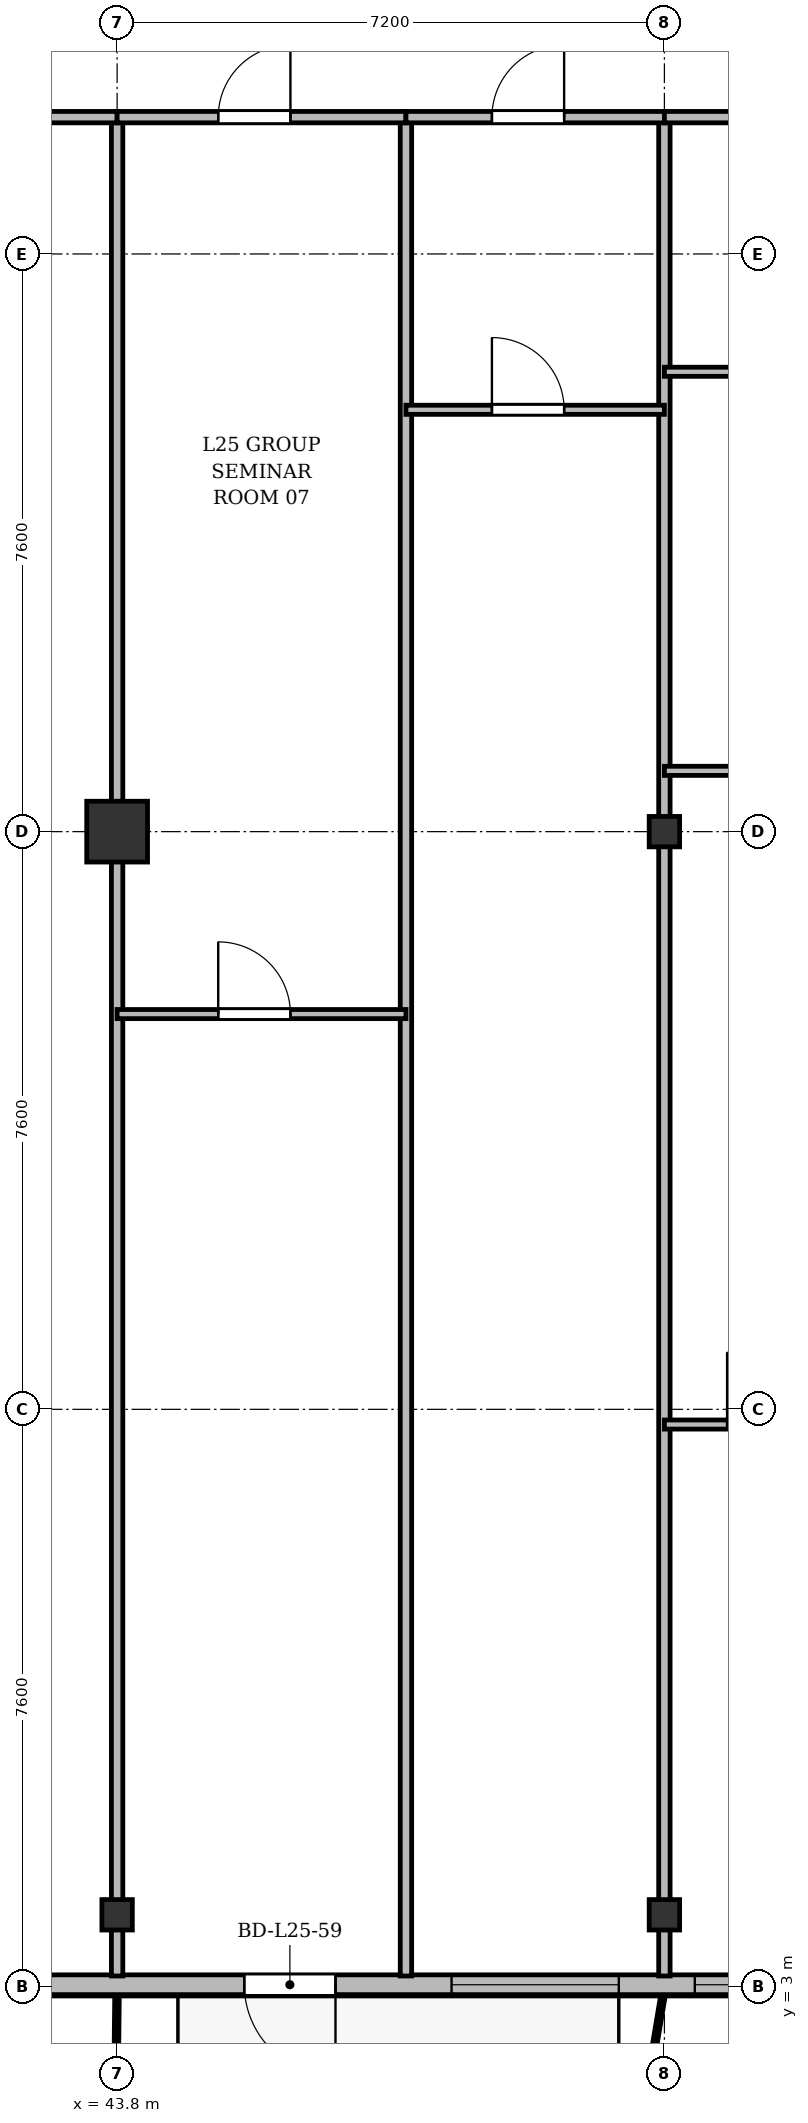
"""IFC4 building model, lengths in metres.
Left out: names, types, materials, properties, quantities, classifications, styles, units other than length and angle.
Written with IfcOpenShell. Run it as: python <this file> out.ifc"""

import sys

from ifc_helpers import new_model, si_unit, direction, frame, frame_2d, origin, origin_2d, place, context, subcontext, project, spatial, rectangle, i_section, extrude, source, transform, mapped, element, fill, save


model = new_model("IFC4")
c1 = context("Model", 3, precision=1e-05, world=origin(), true_north=direction((0.0, 1.0)))
c2 = subcontext(c1, "Body", "Model", "MODEL_VIEW")
j1 = project(units=[si_unit("LENGTHUNIT", "METRE"), si_unit("PLANEANGLEUNIT", "RADIAN")], contexts=[c1])
p1 = place(None, origin())
s1 = spatial("IfcSite", under=j1, at=p1, CompositionType="ELEMENT")
p2 = place(p1, origin())
s2 = spatial("IfcBuilding", under=s1, at=p2, CompositionType="ELEMENT")
p3 = place(p2, frame((0.0, 0.0, 99.7)))
s3 = spatial("IfcBuildingStorey", under=s2, at=p3, CompositionType="ELEMENT", Elevation=99.7)
m1 = source(origin(), c2, "Body", "SweptSolid", [
    extrude(i_section(OverallWidth=0.4, OverallDepth=0.4, WebThickness=0.022, FlangeThickness=0.035, at=origin_2d()), origin(), (0.0, 0.0, 1.0), 3.6),
])
p4 = place(p3, frame((43.8, 3.95, 0.0), z_axis=(0.0, 0.0, 1.0), x_axis=(1.0, 0.0, 0.0)))
e1 = element("IfcColumn", 1, at=p4, inside=s3, PredefinedType="COLUMN", context=c2, shape_type="MappedRepresentation", body=[
    mapped(m1, transform((0.0, 0.0, 0.0), x_axis=(1.0, 0.0, 0.0), y_axis=(0.0, 1.0, 0.0), z_axis=(0.0, 0.0, 1.0), scale=1.0)),
])
m2 = source(origin(), c2, "Body", "SweptSolid", [
    extrude(rectangle(XDim=0.8, YDim=0.8, at=origin_2d()), origin(), (0.0, 0.0, 1.0), 3.6),
])
p5 = place(p3, frame((43.8, 18.2, 0.0), z_axis=(0.0, 0.0, 1.0), x_axis=(1.0, 0.0, 0.0)))
e2 = element("IfcColumn", 2, at=p5, inside=s3, PredefinedType="COLUMN", context=c2, shape_type="MappedRepresentation", body=[
    mapped(m2, transform((0.0, 0.0, 0.0), x_axis=(1.0, 0.0, 0.0), y_axis=(0.0, 1.0, 0.0), z_axis=(0.0, 0.0, 1.0), scale=1.0)),
])
for number, where, z_axis, x_axis in (
    (3, (51.0, 3.95, 0.0), (0.0, 0.0, 1.0), (1.0, 0.0, 0.0)),
    (4, (51.0, 18.2, 0.0), (0.0, 0.0, 1.0), (1.0, 0.0, 0.0)),
):
    element("IfcColumn", number, at=place(p3, frame(where, z_axis=z_axis, x_axis=x_axis)), inside=s3, PredefinedType="COLUMN", context=c2, shape_type="MappedRepresentation", body=[
        mapped(m1, transform((0.0, 0.0, 0.0), x_axis=(1.0, 0.0, 0.0), y_axis=(0.0, 1.0, 0.0), z_axis=(0.0, 0.0, 1.0), scale=1.0)),
    ])
p6 = place(p3, frame((66.9, 3.03, 0.0), z_axis=(0.0, 0.0, 1.0), x_axis=(-1.0, 0.0, 0.0)))
e5 = element("IfcWall", 5, at=p6, inside=s3, PredefinedType="SOLIDWALL", context=c2, shape_type="SweptSolid", body=[
    extrude(rectangle(XDim=59.4, YDim=0.26, at=frame_2d((29.7, 0.0))), origin(), (0.0, 0.0, 1.0), 3.34),
])
p7 = place(p6, frame((1.9, 0.0, 0.9)))
e6 = element("IfcOpeningElement", 6, at=p7, cuts=e5, PredefinedType="OPENING", context=c2, shape_type="SweptSolid", body=[
    extrude(rectangle(XDim=2.2, YDim=1.8, at=frame_2d((1.1, 0.9))), frame((0.0, 0.14, 0.0), z_axis=(0.0, -1.0, 0.0), x_axis=(1.0, 0.0, 0.0)), (0.0, 0.0, 1.0), 0.28),
])
p8 = place(p6, frame((5.65, 0.0, 0.9)))
e7 = element("IfcOpeningElement", 7, at=p8, cuts=e5, PredefinedType="OPENING", context=c2, shape_type="SweptSolid", body=[
    extrude(rectangle(XDim=1.5, YDim=1.75, at=frame_2d((0.75, 0.875))), frame((0.0, 0.14, 0.0), z_axis=(0.0, -1.0, 0.0), x_axis=(1.0, 0.0, 0.0)), (0.0, 0.0, 1.0), 0.28),
])
p9 = place(p6, frame((8.4, 0.0, 0.9)))
e8 = element("IfcOpeningElement", 8, at=p9, cuts=e5, PredefinedType="OPENING", context=c2, shape_type="SweptSolid", body=[
    extrude(rectangle(XDim=2.0, YDim=1.95, at=frame_2d((1.0, 0.975))), frame((0.0, 0.14, 0.0), z_axis=(0.0, -1.0, 0.0), x_axis=(1.0, 0.0, 0.0)), (0.0, 0.0, 1.0), 0.28),
])
p10 = place(p6, frame((11.175, 0.0, 0.9)))
e9 = element("IfcOpeningElement", 9, at=p10, cuts=e5, PredefinedType="OPENING", context=c2, shape_type="SweptSolid", body=[
    extrude(rectangle(XDim=1.65, YDim=1.85, at=frame_2d((0.825, 0.925))), frame((0.0, 0.14, 0.0), z_axis=(0.0, -1.0, 0.0), x_axis=(1.0, 0.0, 0.0)), (0.0, 0.0, 1.0), 0.28),
])
p11 = place(p6, frame((13.7, 0.0, 0.9)))
e10 = element("IfcOpeningElement", 10, at=p11, cuts=e5, PredefinedType="OPENING", context=c2, shape_type="SweptSolid", body=[
    extrude(rectangle(XDim=1.8, YDim=1.8, at=frame_2d((0.9, 0.9))), frame((0.0, 0.14, 0.0), z_axis=(0.0, -1.0, 0.0), x_axis=(1.0, 0.0, 0.0)), (0.0, 0.0, 1.0), 0.28),
])
p12 = place(p6, frame((16.5, 0.0, 0.9)))
e11 = element("IfcOpeningElement", 11, at=p12, cuts=e5, PredefinedType="OPENING", context=c2, shape_type="SweptSolid", body=[
    extrude(rectangle(XDim=2.2, YDim=1.8, at=frame_2d((1.1, 0.9))), frame((0.0, 0.14, 0.0), z_axis=(0.0, -1.0, 0.0), x_axis=(1.0, 0.0, 0.0)), (0.0, 0.0, 1.0), 0.28),
])
p13 = place(p6, frame((20.227, 0.0, 0.0)))
e12 = element("IfcOpeningElement", 12, at=p13, cuts=e5, PredefinedType="OPENING", context=c2, shape_type="SweptSolid", body=[
    extrude(rectangle(XDim=1.2, YDim=2.2, at=frame_2d((0.6, 1.1))), frame((0.0, 0.14, 0.0), z_axis=(0.0, -1.0, 0.0), x_axis=(1.0, 0.0, 0.0)), (0.0, 0.0, 1.0), 0.28),
])
p14 = place(p6, frame((28.7, 0.0, 0.9)))
e13 = element("IfcOpeningElement", 13, at=p14, cuts=e5, PredefinedType="OPENING", context=c2, shape_type="SweptSolid", body=[
    extrude(rectangle(XDim=2.0, YDim=1.95, at=frame_2d((1.0, 0.975))), frame((0.0, 0.14, 0.0), z_axis=(0.0, -1.0, 0.0), x_axis=(1.0, 0.0, 0.0)), (0.0, 0.0, 1.0), 0.28),
])
p15 = place(p6, frame((36.675, 0.0, 0.9)))
e14 = element("IfcOpeningElement", 14, at=p15, cuts=e5, PredefinedType="OPENING", context=c2, shape_type="SweptSolid", body=[
    extrude(rectangle(XDim=1.65, YDim=1.85, at=frame_2d((0.825, 0.925))), frame((0.0, 0.14, 0.0), z_axis=(0.0, -1.0, 0.0), x_axis=(1.0, 0.0, 0.0)), (0.0, 0.0, 1.0), 0.28),
])
p16 = place(p6, frame((39.0, 0.0, 0.9)))
e15 = element("IfcOpeningElement", 15, at=p16, cuts=e5, PredefinedType="OPENING", context=c2, shape_type="SweptSolid", body=[
    extrude(rectangle(XDim=1.8, YDim=1.8, at=frame_2d((0.9, 0.9))), frame((0.0, 0.14, 0.0), z_axis=(0.0, -1.0, 0.0), x_axis=(1.0, 0.0, 0.0)), (0.0, 0.0, 1.0), 0.28),
])
p17 = place(p6, frame((41.55, 0.0, 0.9)))
e16 = element("IfcOpeningElement", 16, at=p17, cuts=e5, PredefinedType="OPENING", context=c2, shape_type="SweptSolid", body=[
    extrude(rectangle(XDim=1.5, YDim=1.75, at=frame_2d((0.75, 0.875))), frame((0.0, 0.14, 0.0), z_axis=(0.0, -1.0, 0.0), x_axis=(1.0, 0.0, 0.0)), (0.0, 0.0, 1.0), 0.28),
])
p18 = place(p6, frame((45.36, 0.0, 0.0)))
e17 = element("IfcOpeningElement", 17, at=p18, cuts=e5, PredefinedType="OPENING", context=c2, shape_type="SweptSolid", body=[
    extrude(rectangle(XDim=1.2, YDim=2.2, at=frame_2d((0.6, 1.1))), frame((0.0, 0.14, 0.0), z_axis=(0.0, -1.0, 0.0), x_axis=(1.0, 0.0, 0.0)), (0.0, 0.0, 1.0), 0.28),
])
p19 = place(p6, frame((48.3, 0.0, 0.9)))
e18 = element("IfcOpeningElement", 18, at=p19, cuts=e5, PredefinedType="OPENING", context=c2, shape_type="SweptSolid", body=[
    extrude(rectangle(XDim=2.0, YDim=1.95, at=frame_2d((1.0, 0.975))), frame((0.0, 0.14, 0.0), z_axis=(0.0, -1.0, 0.0), x_axis=(1.0, 0.0, 0.0)), (0.0, 0.0, 1.0), 0.28),
])
p20 = place(p6, frame((52.175, 0.0, 0.9)))
e19 = element("IfcOpeningElement", 19, at=p20, cuts=e5, PredefinedType="OPENING", context=c2, shape_type="SweptSolid", body=[
    extrude(rectangle(XDim=1.65, YDim=1.85, at=frame_2d((0.825, 0.925))), frame((0.0, 0.14, 0.0), z_axis=(0.0, -1.0, 0.0), x_axis=(1.0, 0.0, 0.0)), (0.0, 0.0, 1.0), 0.28),
])
p21 = place(p6, frame((55.5, 0.0, 0.9)))
e20 = element("IfcOpeningElement", 20, at=p21, cuts=e5, PredefinedType="OPENING", context=c2, shape_type="SweptSolid", body=[
    extrude(rectangle(XDim=1.8, YDim=1.8, at=frame_2d((0.9, 0.9))), frame((0.0, 0.14, 0.0), z_axis=(0.0, -1.0, 0.0), x_axis=(1.0, 0.0, 0.0)), (0.0, 0.0, 1.0), 0.28),
])
p22 = place(p3, frame((43.8, 3.145, 0.0), z_axis=(0.0, 0.0, 1.0), x_axis=(0.0, 1.0, 0.0)))
e21 = element("IfcWall", 21, at=p22, inside=s3, PredefinedType="PARTITIONING", context=c2, shape_type="SweptSolid", body=[
    extrude(rectangle(XDim=24.455, YDim=0.15, at=frame_2d((12.228, 0.0))), origin(), (0.0, 0.0, 1.0), 2.84),
])
p23 = place(p3, frame((47.6, 3.145, 0.0), z_axis=(0.0, 0.0, 1.0), x_axis=(0.0, 1.0, 0.0)))
e22 = element("IfcWall", 22, at=p23, inside=s3, PredefinedType="PARTITIONING", context=c2, shape_type="SweptSolid", body=[
    extrude(rectangle(XDim=24.455, YDim=0.15, at=frame_2d((12.228, 0.0))), origin(), (0.0, 0.0, 1.0), 2.752),
])
p24 = place(p3, frame((51.0, 3.145, 0.0), z_axis=(0.0, 0.0, 1.0), x_axis=(0.0, 1.0, 0.0)))
e23 = element("IfcWall", 23, at=p24, inside=s3, PredefinedType="PARTITIONING", context=c2, shape_type="SweptSolid", body=[
    extrude(rectangle(XDim=24.455, YDim=0.15, at=frame_2d((12.228, 0.0))), origin(), (0.0, 0.0, 1.0), 2.84),
])
p25 = place(p3, frame((30.6, 27.6, 0.0), z_axis=(0.0, 0.0, 1.0), x_axis=(1.0, 0.0, 0.0)))
e24 = element("IfcWall", 24, at=p25, inside=s3, PredefinedType="PARTITIONING", context=c2, shape_type="SweptSolid", body=[
    extrude(rectangle(XDim=13.2, YDim=0.15, at=frame_2d((6.6, 0.0))), origin(), (0.0, 0.0, 1.0), 2.84),
])
p26 = place(p25, frame((5.8, 0.0, 0.0)))
e25 = element("IfcOpeningElement", 25, at=p26, cuts=e24, PredefinedType="OPENING", context=c2, shape_type="SweptSolid", body=[
    extrude(rectangle(XDim=1.6, YDim=2.2, at=frame_2d((0.8, 1.1))), frame((0.0, 0.085, 0.0), z_axis=(0.0, -1.0, 0.0), x_axis=(1.0, 0.0, 0.0)), (0.0, 0.0, 1.0), 0.17),
])
p27 = place(p3, frame((43.8, 27.6, 0.0), z_axis=(0.0, 0.0, 1.0), x_axis=(1.0, 0.0, 0.0)))
e26 = element("IfcWall", 26, at=p27, inside=s3, PredefinedType="PARTITIONING", context=c2, shape_type="SweptSolid", body=[
    extrude(rectangle(XDim=3.8, YDim=0.15, at=frame_2d((1.9, 0.0))), origin(), (0.0, 0.0, 1.0), 2.84),
])
p28 = place(p27, frame((1.33, 0.0, 0.0)))
e27 = element("IfcOpeningElement", 27, at=p28, cuts=e26, PredefinedType="OPENING", context=c2, shape_type="SweptSolid", body=[
    extrude(rectangle(XDim=0.95, YDim=2.15, at=frame_2d((0.475, 1.075))), frame((0.0, 0.085, 0.0), z_axis=(0.0, -1.0, 0.0), x_axis=(1.0, 0.0, 0.0)), (0.0, 0.0, 1.0), 0.17),
])
p29 = place(p3, frame((43.8, 15.8, 0.0), z_axis=(0.0, 0.0, 1.0), x_axis=(1.0, 0.0, 0.0)))
e28 = element("IfcWall", 28, at=p29, inside=s3, PredefinedType="PARTITIONING", context=c2, shape_type="SweptSolid", body=[
    extrude(rectangle(XDim=3.8, YDim=0.12, at=frame_2d((1.9, 0.0))), origin(), (0.0, 0.0, 1.0), 2.84),
])
p30 = place(p29, frame((1.33, 0.0, 0.0)))
e29 = element("IfcOpeningElement", 29, at=p30, cuts=e28, PredefinedType="OPENING", context=c2, shape_type="SweptSolid", body=[
    extrude(rectangle(XDim=0.95, YDim=2.15, at=frame_2d((0.475, 1.075))), frame((0.0, 0.07, 0.0), z_axis=(0.0, -1.0, 0.0), x_axis=(1.0, 0.0, 0.0)), (0.0, 0.0, 1.0), 0.14),
])
p31 = place(p3, frame((47.6, 27.6, 0.0), z_axis=(0.0, 0.0, 1.0), x_axis=(1.0, 0.0, 0.0)))
e30 = element("IfcWall", 30, at=p31, inside=s3, PredefinedType="PARTITIONING", context=c2, shape_type="SweptSolid", body=[
    extrude(rectangle(XDim=3.4, YDim=0.15, at=frame_2d((1.7, 0.0))), origin(), (0.0, 0.0, 1.0), 2.84),
])
p32 = place(p31, frame((1.131, 0.0, 0.0)))
e31 = element("IfcOpeningElement", 31, at=p32, cuts=e30, PredefinedType="OPENING", context=c2, shape_type="SweptSolid", body=[
    extrude(rectangle(XDim=0.95, YDim=2.15, at=frame_2d((0.475, 1.075))), frame((0.0, 0.085, 0.0), z_axis=(0.0, -1.0, 0.0), x_axis=(1.0, 0.0, 0.0)), (0.0, 0.0, 1.0), 0.17),
])
p33 = place(p3, frame((47.6, 23.75, 0.0), z_axis=(0.0, 0.0, 1.0), x_axis=(1.0, 0.0, 0.0)))
e32 = element("IfcWall", 32, at=p33, inside=s3, PredefinedType="PARTITIONING", context=c2, shape_type="SweptSolid", body=[
    extrude(rectangle(XDim=3.4, YDim=0.12, at=frame_2d((1.7, 0.0))), origin(), (0.0, 0.0, 1.0), 2.84),
])
p34 = place(p33, frame((1.131, 0.0, 0.0)))
e33 = element("IfcOpeningElement", 33, at=p34, cuts=e32, PredefinedType="OPENING", context=c2, shape_type="SweptSolid", body=[
    extrude(rectangle(XDim=0.95, YDim=2.15, at=frame_2d((0.475, 1.075))), frame((0.0, 0.07, 0.0), z_axis=(0.0, -1.0, 0.0), x_axis=(1.0, 0.0, 0.0)), (0.0, 0.0, 1.0), 0.14),
])
p35 = place(p3, frame((51.0, 19.0, 0.0), z_axis=(0.0, 0.0, 1.0), x_axis=(1.0, 0.0, 0.0)))
e34 = element("IfcWall", 34, at=p35, inside=s3, PredefinedType="PARTITIONING", context=c2, shape_type="SweptSolid", body=[
    extrude(rectangle(XDim=7.8, YDim=0.12, at=frame_2d((3.9, 0.0))), origin(), (0.0, 0.0, 1.0), 2.84),
])
p36 = place(p35, frame((3.333, 0.0, 0.0)))
e35 = element("IfcOpeningElement", 35, at=p36, cuts=e34, PredefinedType="OPENING", context=c2, shape_type="SweptSolid", body=[
    extrude(rectangle(XDim=0.95, YDim=2.15, at=frame_2d((0.475, 1.075))), frame((0.0, 0.07, 0.0), z_axis=(0.0, -1.0, 0.0), x_axis=(1.0, 0.0, 0.0)), (0.0, 0.0, 1.0), 0.14),
])
p37 = place(p3, frame((51.0, 24.25, 0.0), z_axis=(0.0, 0.0, 1.0), x_axis=(1.0, 0.0, 0.0)))
e36 = element("IfcWall", 36, at=p37, inside=s3, PredefinedType="PARTITIONING", context=c2, shape_type="SweptSolid", body=[
    extrude(rectangle(XDim=2.4, YDim=0.12, at=frame_2d((1.2, 0.0))), origin(), (0.0, 0.0, 1.0), 2.84),
])
p38 = place(p3, frame((51.0, 27.6, 0.0), z_axis=(0.0, 0.0, 1.0), x_axis=(1.0, 0.0, 0.0)))
e37 = element("IfcWall", 37, at=p38, inside=s3, PredefinedType="PARTITIONING", context=c2, shape_type="SweptSolid", body=[
    extrude(rectangle(XDim=7.8, YDim=0.15, at=frame_2d((3.9, 0.0))), origin(), (0.0, 0.0, 1.0), 2.84),
])
p39 = place(p38, frame((5.172, 0.0, 0.0)))
e38 = element("IfcOpeningElement", 38, at=p39, cuts=e37, PredefinedType="OPENING", context=c2, shape_type="SweptSolid", body=[
    extrude(rectangle(XDim=0.95, YDim=2.15, at=frame_2d((0.475, 1.075))), frame((0.0, 0.085, 0.0), z_axis=(0.0, -1.0, 0.0), x_axis=(1.0, 0.0, 0.0)), (0.0, 0.0, 1.0), 0.17),
])
p40 = place(p3, frame((51.0, 10.4, 0.0), z_axis=(0.0, 0.0, 1.0), x_axis=(1.0, 0.0, 0.0)))
e39 = element("IfcWall", 39, at=p40, inside=s3, PredefinedType="PARTITIONING", context=c2, shape_type="SweptSolid", body=[
    extrude(rectangle(XDim=2.6, YDim=0.12, at=frame_2d((1.3, 0.0))), origin(), (0.0, 0.0, 1.0), 2.84),
])
p41 = place(p40, frame((0.825, 0.0, 0.0)))
e40 = element("IfcOpeningElement", 40, at=p41, cuts=e39, PredefinedType="OPENING", context=c2, shape_type="SweptSolid", body=[
    extrude(rectangle(XDim=0.95, YDim=2.15, at=frame_2d((0.475, 1.075))), frame((0.0, 0.07, 0.0), z_axis=(0.0, -1.0, 0.0), x_axis=(1.0, 0.0, 0.0)), (0.0, 0.0, 1.0), 0.14),
])
m3 = source(origin(), c2, "Body", "SweptSolid", [
    extrude(rectangle(XDim=1.8, YDim=1.8, at=frame_2d((0.9, 0.9))), frame((0.0, 0.03, 0.0), z_axis=(0.0, -1.0, 0.0), x_axis=(1.0, 0.0, 0.0)), (0.0, 0.0, 1.0), 0.06),
])
p42 = place(p11, origin())
e41 = element("IfcWindow", 41, at=p42, inside=s3, PartitioningType="SINGLE_PANEL", PredefinedType="WINDOW", context=c2, shape_type="MappedRepresentation", body=[
    mapped(m3, transform((0.0, 0.0, 0.0), x_axis=(1.0, 0.0, 0.0), y_axis=(0.0, 1.0, 0.0), z_axis=(0.0, 0.0, 1.0), scale=1.0)),
])
fill(e10, e41)
m4 = source(origin(), c2, "Body", "SweptSolid", [
    extrude(rectangle(XDim=2.2, YDim=1.8, at=frame_2d((1.1, 0.9))), frame((0.0, 0.03, 0.0), z_axis=(0.0, -1.0, 0.0), x_axis=(1.0, 0.0, 0.0)), (0.0, 0.0, 1.0), 0.06),
])
p43 = place(p12, origin())
e42 = element("IfcWindow", 42, at=p43, inside=s3, PartitioningType="SINGLE_PANEL", PredefinedType="WINDOW", context=c2, shape_type="MappedRepresentation", body=[
    mapped(m4, transform((0.0, 0.0, 0.0), x_axis=(1.0, 0.0, 0.0), y_axis=(0.0, 1.0, 0.0), z_axis=(0.0, 0.0, 1.0), scale=1.0)),
])
fill(e11, e42)
m5 = source(origin(), c2, "Body", "SweptSolid", [
    extrude(rectangle(XDim=1.2, YDim=2.2, at=frame_2d((0.6, 1.1))), frame((0.0, 0.025, 0.0), z_axis=(0.0, -1.0, 0.0), x_axis=(1.0, 0.0, 0.0)), (0.0, 0.0, 1.0), 0.05),
])
p44 = place(p13, origin())
e43 = element("IfcDoor", 43, at=p44, inside=s3, OperationType="SINGLE_SWING_LEFT", PredefinedType="DOOR", context=c2, shape_type="MappedRepresentation", body=[
    mapped(m5, transform((0.0, 0.0, 0.0), x_axis=(1.0, 0.0, 0.0), y_axis=(0.0, 1.0, 0.0), z_axis=(0.0, 0.0, 1.0), scale=1.0)),
])
fill(e12, e43)
m6 = source(origin(), c2, "Body", "SweptSolid", [
    extrude(rectangle(XDim=0.95, YDim=2.15, at=frame_2d((0.475, 1.075))), frame((0.0, 0.025, 0.0), z_axis=(0.0, -1.0, 0.0), x_axis=(1.0, 0.0, 0.0)), (0.0, 0.0, 1.0), 0.05),
])
p45 = place(p28, origin())
e44 = element("IfcDoor", 44, at=p45, inside=s3, OperationType="SINGLE_SWING_RIGHT", PredefinedType="DOOR", context=c2, shape_type="MappedRepresentation", body=[
    mapped(m6, transform((0.0, 0.0, 0.0), x_axis=(1.0, 0.0, 0.0), y_axis=(0.0, 1.0, 0.0), z_axis=(0.0, 0.0, 1.0), scale=1.0)),
])
fill(e27, e44)
p46 = place(p30, origin())
e45 = element("IfcDoor", 45, at=p46, inside=s3, OperationType="SINGLE_SWING_LEFT", PredefinedType="DOOR", context=c2, shape_type="MappedRepresentation", body=[
    mapped(m6, transform((0.0, 0.0, 0.0), x_axis=(1.0, 0.0, 0.0), y_axis=(0.0, 1.0, 0.0), z_axis=(0.0, 0.0, 1.0), scale=1.0)),
])
fill(e29, e45)
p47 = place(p32, origin())
e46 = element("IfcDoor", 46, at=p47, inside=s3, OperationType="SINGLE_SWING_RIGHT", PredefinedType="DOOR", context=c2, shape_type="MappedRepresentation", body=[
    mapped(m6, transform((0.0, 0.0, 0.0), x_axis=(1.0, 0.0, 0.0), y_axis=(0.0, 1.0, 0.0), z_axis=(0.0, 0.0, 1.0), scale=1.0)),
])
fill(e31, e46)
p48 = place(p34, origin())
e47 = element("IfcDoor", 47, at=p48, inside=s3, OperationType="SINGLE_SWING_LEFT", PredefinedType="DOOR", context=c2, shape_type="MappedRepresentation", body=[
    mapped(m6, transform((0.0, 0.0, 0.0), x_axis=(1.0, 0.0, 0.0), y_axis=(0.0, 1.0, 0.0), z_axis=(0.0, 0.0, 1.0), scale=1.0)),
])
fill(e33, e47)
p49 = place(p41, origin())
e48 = element("IfcDoor", 48, at=p49, inside=s3, OperationType="SINGLE_SWING_LEFT", PredefinedType="DOOR", context=c2, shape_type="MappedRepresentation", body=[
    mapped(m6, transform((0.0, 0.0, 0.0), x_axis=(1.0, 0.0, 0.0), y_axis=(0.0, 1.0, 0.0), z_axis=(0.0, 0.0, 1.0), scale=1.0)),
])
fill(e40, e48)
save(model, sys.argv[1])
